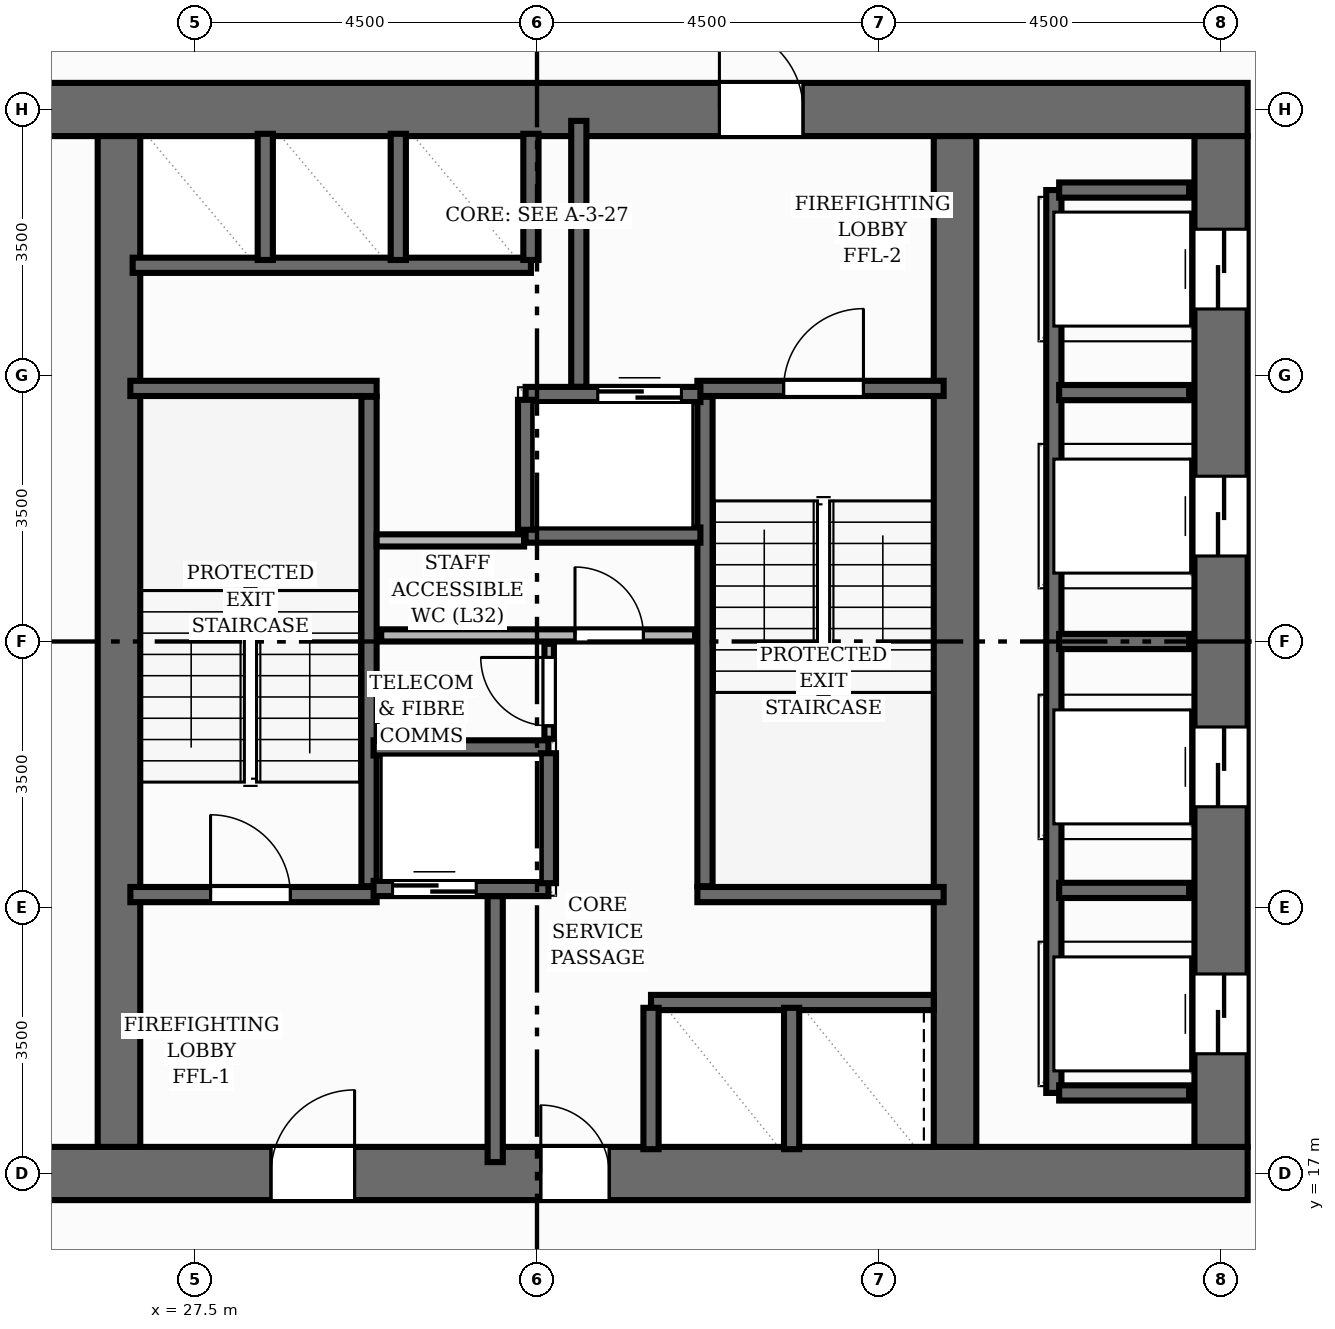
"""IFC4 building model, lengths in metres.
Left out: names, types, materials, properties, quantities, classifications, styles, units other than length and angle.
Written with IfcOpenShell. Run it as: python <this file> out.ifc"""

import sys

from ifc_helpers import new_model, si_unit, direction, frame, frame_2d, origin, place, context, subcontext, project, spatial, rectangle, extrude, element, fill, save


model = new_model("IFC4")
c1 = context("Model", 3, precision=1e-05, world=origin(), true_north=direction((0.0, 1.0)))
c2 = subcontext(c1, "Body", "Model", "MODEL_VIEW")
j1 = project(units=[si_unit("LENGTHUNIT", "METRE"), si_unit("PLANEANGLEUNIT", "RADIAN")], contexts=[c1])
p1 = place(None, origin())
s1 = spatial("IfcSite", under=j1, at=p1, CompositionType="ELEMENT")
p2 = place(p1, origin())
s2 = spatial("IfcBuilding", under=s1, at=p2, CompositionType="ELEMENT")
p3 = place(p2, frame((0.0, 0.0, 109.28)))
s3 = spatial("IfcBuildingStorey", under=s2, at=p3, CompositionType="ELEMENT", Elevation=109.28)
p4 = place(p3, frame((22.65, 17.0, 0.0), z_axis=(0.0, 0.0, 1.0), x_axis=(1.0, 0.0, 0.0)))
e1 = element("IfcWall", 1, at=p4, inside=s3, PredefinedType="SHEAR", context=c2, shape_type="SweptSolid", body=[
    extrude(rectangle(XDim=18.7, YDim=0.7, at=frame_2d((9.35, 0.0))), origin(), (0.0, 0.0, 1.0), 3.2),
])
p5 = place(p4, frame((5.85, 0.0, 0.0)))
e2 = element("IfcOpeningElement", 2, at=p5, cuts=e1, PredefinedType="OPENING", context=c2, shape_type="SweptSolid", body=[
    extrude(rectangle(XDim=1.1, YDim=2.15, at=frame_2d((0.55, 1.075))), frame((0.0, 0.36, 0.0), z_axis=(0.0, -1.0, 0.0), x_axis=(1.0, 0.0, 0.0)), (0.0, 0.0, 1.0), 0.72),
])
p6 = place(p4, frame((9.4, 0.0, 0.0)))
e3 = element("IfcOpeningElement", 3, at=p6, cuts=e1, PredefinedType="OPENING", context=c2, shape_type="SweptSolid", body=[
    extrude(rectangle(XDim=0.9, YDim=2.0, at=frame_2d((0.45, 1.0))), frame((0.0, 0.36, 0.0), z_axis=(0.0, -1.0, 0.0), x_axis=(1.0, 0.0, 0.0)), (0.0, 0.0, 1.0), 0.72),
])
p7 = place(p3, frame((22.65, 31.0, 0.0), z_axis=(0.0, 0.0, 1.0), x_axis=(1.0, 0.0, 0.0)))
e4 = element("IfcWall", 4, at=p7, inside=s3, PredefinedType="SHEAR", context=c2, shape_type="SweptSolid", body=[
    extrude(rectangle(XDim=18.7, YDim=0.7, at=frame_2d((9.35, 0.0))), origin(), (0.0, 0.0, 1.0), 3.2),
])
p8 = place(p7, frame((11.75, 0.0, 0.0)))
e5 = element("IfcOpeningElement", 5, at=p8, cuts=e4, PredefinedType="OPENING", context=c2, shape_type="SweptSolid", body=[
    extrude(rectangle(XDim=1.1, YDim=2.15, at=frame_2d((0.55, 1.075))), frame((0.0, 0.36, 0.0), z_axis=(0.0, -1.0, 0.0), x_axis=(1.0, 0.0, 0.0)), (0.0, 0.0, 1.0), 0.72),
])
p9 = place(p3, frame((41.0, 17.35, 0.0), z_axis=(0.0, 0.0, 1.0), x_axis=(0.0, 1.0, 0.0)))
e6 = element("IfcWall", 6, at=p9, inside=s3, PredefinedType="SHEAR", context=c2, shape_type="SweptSolid", body=[
    extrude(rectangle(XDim=13.3, YDim=0.7, at=frame_2d((6.65, 0.0))), origin(), (0.0, 0.0, 1.0), 3.2),
])
p10 = place(p9, frame((1.225, 0.0, 0.0)))
e7 = element("IfcOpeningElement", 7, at=p10, cuts=e6, PredefinedType="OPENING", context=c2, shape_type="SweptSolid", body=[
    extrude(rectangle(XDim=1.05, YDim=2.0, at=frame_2d((0.525, 1.0))), frame((0.0, 0.36, 0.0), z_axis=(0.0, -1.0, 0.0), x_axis=(1.0, 0.0, 0.0)), (0.0, 0.0, 1.0), 0.72),
])
p11 = place(p9, frame((4.475, 0.0, 0.0)))
e8 = element("IfcOpeningElement", 8, at=p11, cuts=e6, PredefinedType="OPENING", context=c2, shape_type="SweptSolid", body=[
    extrude(rectangle(XDim=1.05, YDim=2.0, at=frame_2d((0.525, 1.0))), frame((0.0, 0.36, 0.0), z_axis=(0.0, -1.0, 0.0), x_axis=(1.0, 0.0, 0.0)), (0.0, 0.0, 1.0), 0.72),
])
p12 = place(p9, frame((7.775, 0.0, 0.0)))
e9 = element("IfcOpeningElement", 9, at=p12, cuts=e6, PredefinedType="OPENING", context=c2, shape_type="SweptSolid", body=[
    extrude(rectangle(XDim=1.05, YDim=2.0, at=frame_2d((0.525, 1.0))), frame((0.0, 0.36, 0.0), z_axis=(0.0, -1.0, 0.0), x_axis=(1.0, 0.0, 0.0)), (0.0, 0.0, 1.0), 0.72),
])
p13 = place(p9, frame((11.025, 0.0, 0.0)))
e10 = element("IfcOpeningElement", 10, at=p13, cuts=e6, PredefinedType="OPENING", context=c2, shape_type="SweptSolid", body=[
    extrude(rectangle(XDim=1.05, YDim=2.0, at=frame_2d((0.525, 1.0))), frame((0.0, 0.36, 0.0), z_axis=(0.0, -1.0, 0.0), x_axis=(1.0, 0.0, 0.0)), (0.0, 0.0, 1.0), 0.72),
])
for number, where, z_axis, x_axis in (
    (11, (26.5, 17.35, 0.0), (0.0, 0.0, 1.0), (0.0, 1.0, 0.0)),
    (12, (37.5, 17.35, 0.0), (0.0, 0.0, 1.0), (0.0, 1.0, 0.0)),
):
    element("IfcWall", number, at=place(p3, frame(where, z_axis=z_axis, x_axis=x_axis)), inside=s3, PredefinedType="SHEAR", context=c2, shape_type="SweptSolid", body=[
        extrude(rectangle(XDim=13.3, YDim=0.56, at=frame_2d((6.65, 0.0))), origin(), (0.0, 0.0, 1.0), 3.2),
    ])
p14 = place(p3, frame((29.79, 20.78, 0.0), z_axis=(0.0, 0.0, 1.0), x_axis=(0.0, 1.0, 0.0)))
e13 = element("IfcWall", 13, at=p14, inside=s3, PredefinedType="SHEAR", context=c2, shape_type="SweptSolid", body=[
    extrude(rectangle(XDim=6.44, YDim=0.2, at=frame_2d((3.22, 0.0))), origin(), (0.0, 0.0, 1.0), 3.2),
])
p15 = place(p3, frame((26.65, 27.33, 0.0), z_axis=(0.0, 0.0, 1.0), x_axis=(1.0, 0.0, 0.0)))
e14 = element("IfcWall", 14, at=p15, inside=s3, PredefinedType="SHEAR", context=c2, shape_type="SweptSolid", body=[
    extrude(rectangle(XDim=3.24, YDim=0.2, at=frame_2d((1.62, 0.0))), origin(), (0.0, 0.0, 1.0), 3.2),
])
p16 = place(p3, frame((26.65, 20.67, 0.0), z_axis=(0.0, 0.0, 1.0), x_axis=(1.0, 0.0, 0.0)))
e15 = element("IfcWall", 15, at=p16, inside=s3, PredefinedType="SHEAR", context=c2, shape_type="SweptSolid", body=[
    extrude(rectangle(XDim=3.24, YDim=0.2, at=frame_2d((1.62, 0.0))), origin(), (0.0, 0.0, 1.0), 3.2),
])
p17 = place(p16, frame((1.055, 0.0, 0.0)))
e16 = element("IfcOpeningElement", 16, at=p17, cuts=e15, PredefinedType="OPENING", context=c2, shape_type="SweptSolid", body=[
    extrude(rectangle(XDim=1.05, YDim=2.15, at=frame_2d((0.525, 1.075))), frame((0.0, 0.11, 0.0), z_axis=(0.0, -1.0, 0.0), x_axis=(1.0, 0.0, 0.0)), (0.0, 0.0, 1.0), 0.22),
])
p18 = place(p3, frame((34.21, 20.78, 0.0), z_axis=(0.0, 0.0, 1.0), x_axis=(0.0, 1.0, 0.0)))
e17 = element("IfcWall", 17, at=p18, inside=s3, PredefinedType="SHEAR", context=c2, shape_type="SweptSolid", body=[
    extrude(rectangle(XDim=6.44, YDim=0.2, at=frame_2d((3.22, 0.0))), origin(), (0.0, 0.0, 1.0), 3.2),
])
p19 = place(p3, frame((34.11, 20.67, 0.0), z_axis=(0.0, 0.0, 1.0), x_axis=(1.0, 0.0, 0.0)))
e18 = element("IfcWall", 18, at=p19, inside=s3, PredefinedType="SHEAR", context=c2, shape_type="SweptSolid", body=[
    extrude(rectangle(XDim=3.24, YDim=0.2, at=frame_2d((1.62, 0.0))), origin(), (0.0, 0.0, 1.0), 3.2),
])
p20 = place(p3, frame((34.11, 27.33, 0.0), z_axis=(0.0, 0.0, 1.0), x_axis=(1.0, 0.0, 0.0)))
e19 = element("IfcWall", 19, at=p20, inside=s3, PredefinedType="SHEAR", context=c2, shape_type="SweptSolid", body=[
    extrude(rectangle(XDim=3.24, YDim=0.2, at=frame_2d((1.62, 0.0))), origin(), (0.0, 0.0, 1.0), 3.2),
])
p21 = place(p20, frame((1.135, 0.0, 0.0)))
e20 = element("IfcOpeningElement", 20, at=p21, cuts=e19, PredefinedType="OPENING", context=c2, shape_type="SweptSolid", body=[
    extrude(rectangle(XDim=1.05, YDim=2.15, at=frame_2d((0.525, 1.075))), frame((0.0, 0.11, 0.0), z_axis=(0.0, -1.0, 0.0), x_axis=(1.0, 0.0, 0.0)), (0.0, 0.0, 1.0), 0.22),
])
for number, where, z_axis, x_axis in (
    (21, (31.45, 17.15, 0.0), (0.0, 0.0, 1.0), (0.0, 1.0, 0.0)),
    (22, (32.55, 27.35, 0.0), (0.0, 0.0, 1.0), (0.0, 1.0, 0.0)),
):
    element("IfcWall", number, at=place(p3, frame(where, z_axis=z_axis, x_axis=x_axis)), inside=s3, PredefinedType="SHEAR", context=c2, shape_type="SweptSolid", body=[
        extrude(rectangle(XDim=3.5, YDim=0.2, at=frame_2d((1.75, 0.0))), origin(), (0.0, 0.0, 1.0), 3.2),
    ])
p22 = place(p3, frame((29.85, 20.75, 0.0), z_axis=(0.0, 0.0, 1.0), x_axis=(1.0, 0.0, 0.0)))
e23 = element("IfcWall", 23, at=p22, inside=s3, PredefinedType="SHEAR", context=c2, shape_type="SweptSolid", body=[
    extrude(rectangle(XDim=2.3, YDim=0.2, at=frame_2d((1.15, 0.0))), origin(), (0.0, 0.0, 1.0), 3.2),
])
p23 = place(p22, frame((0.25, 0.0, 0.0)))
e24 = element("IfcOpeningElement", 24, at=p23, cuts=e23, PredefinedType="OPENING", context=c2, shape_type="SweptSolid", body=[
    extrude(rectangle(XDim=1.1, YDim=2.15, at=frame_2d((0.55, 1.075))), frame((0.0, 0.11, 0.0), z_axis=(0.0, -1.0, 0.0), x_axis=(1.0, 0.0, 0.0)), (0.0, 0.0, 1.0), 0.22),
])
p24 = place(p3, frame((29.85, 22.6, 0.0), z_axis=(0.0, 0.0, 1.0), x_axis=(1.0, 0.0, 0.0)))
e25 = element("IfcWall", 25, at=p24, inside=s3, PredefinedType="SHEAR", context=c2, shape_type="SweptSolid", body=[
    extrude(rectangle(XDim=2.3, YDim=0.2, at=frame_2d((1.15, 0.0))), origin(), (0.0, 0.0, 1.0), 3.2),
])
p25 = place(p3, frame((32.15, 20.82, 0.0), z_axis=(0.0, 0.0, 1.0), x_axis=(0.0, 1.0, 0.0)))
e26 = element("IfcWall", 26, at=p25, inside=s3, PredefinedType="SHEAR", context=c2, shape_type="SweptSolid", body=[
    extrude(rectangle(XDim=1.71, YDim=0.2, at=frame_2d((0.855, 0.0))), origin(), (0.0, 0.0, 1.0), 3.2),
])
p26 = place(p3, frame((31.85, 27.25, 0.0), z_axis=(0.0, 0.0, 1.0), x_axis=(1.0, 0.0, 0.0)))
e27 = element("IfcWall", 27, at=p26, inside=s3, PredefinedType="SHEAR", context=c2, shape_type="SweptSolid", body=[
    extrude(rectangle(XDim=2.3, YDim=0.2, at=frame_2d((1.15, 0.0))), origin(), (0.0, 0.0, 1.0), 3.2),
])
p27 = place(p26, frame((0.95, 0.0, 0.0)))
e28 = element("IfcOpeningElement", 28, at=p27, cuts=e27, PredefinedType="OPENING", context=c2, shape_type="SweptSolid", body=[
    extrude(rectangle(XDim=1.1, YDim=2.15, at=frame_2d((0.55, 1.075))), frame((0.0, 0.11, 0.0), z_axis=(0.0, -1.0, 0.0), x_axis=(1.0, 0.0, 0.0)), (0.0, 0.0, 1.0), 0.22),
])
p28 = place(p3, frame((31.85, 25.4, 0.0), z_axis=(0.0, 0.0, 1.0), x_axis=(1.0, 0.0, 0.0)))
e29 = element("IfcWall", 29, at=p28, inside=s3, PredefinedType="SHEAR", context=c2, shape_type="SweptSolid", body=[
    extrude(rectangle(XDim=2.3, YDim=0.2, at=frame_2d((1.15, 0.0))), origin(), (0.0, 0.0, 1.0), 3.2),
])
p29 = place(p3, frame((31.85, 25.47, 0.0), z_axis=(0.0, 0.0, 1.0), x_axis=(0.0, 1.0, 0.0)))
e30 = element("IfcWall", 30, at=p29, inside=s3, PredefinedType="SHEAR", context=c2, shape_type="SweptSolid", body=[
    extrude(rectangle(XDim=1.71, YDim=0.2, at=frame_2d((0.855, 0.0))), origin(), (0.0, 0.0, 1.0), 3.2),
])
p30 = place(p3, frame((38.8, 18.06, 0.0), z_axis=(0.0, 0.0, 1.0), x_axis=(0.0, 1.0, 0.0)))
e31 = element("IfcWall", 31, at=p30, inside=s3, PredefinedType="SHEAR", context=c2, shape_type="SweptSolid", body=[
    extrude(rectangle(XDim=11.88, YDim=0.2, at=frame_2d((5.94, 0.0))), origin(), (0.0, 0.0, 1.0), 3.2),
])
for number, where, z_axis, x_axis in (
    (32, (38.87, 18.06, 0.0), (0.0, 0.0, 1.0), (1.0, 0.0, 0.0)),
    (33, (38.87, 29.94, 0.0), (0.0, 0.0, 1.0), (1.0, 0.0, 0.0)),
    (34, (38.87, 20.725, 0.0), (0.0, 0.0, 1.0), (1.0, 0.0, 0.0)),
    (35, (38.87, 24.0, 0.0), (0.0, 0.0, 1.0), (1.0, 0.0, 0.0)),
    (36, (38.87, 27.275, 0.0), (0.0, 0.0, 1.0), (1.0, 0.0, 0.0)),
):
    element("IfcWall", number, at=place(p3, frame(where, z_axis=z_axis, x_axis=x_axis)), inside=s3, PredefinedType="SHEAR", context=c2, shape_type="SweptSolid", body=[
        extrude(rectangle(XDim=1.71, YDim=0.2, at=frame_2d((0.855, 0.0))), origin(), (0.0, 0.0, 1.0), 3.2),
    ])
p31 = place(p3, frame((26.68, 28.95, 0.0), z_axis=(0.0, 0.0, 1.0), x_axis=(1.0, 0.0, 0.0)))
e37 = element("IfcWall", 37, at=p31, inside=s3, PredefinedType="SHEAR", context=c2, shape_type="SweptSolid", body=[
    extrude(rectangle(XDim=5.24, YDim=0.2, at=frame_2d((2.62, 0.0))), origin(), (0.0, 0.0, 1.0), 3.2),
])
for number, where, z_axis, x_axis in (
    (38, (31.92, 29.02, 0.0), (0.0, 0.0, 1.0), (0.0, 1.0, 0.0)),
    (39, (28.425, 29.02, 0.0), (0.0, 0.0, 1.0), (0.0, 1.0, 0.0)),
    (40, (30.175, 29.02, 0.0), (0.0, 0.0, 1.0), (0.0, 1.0, 0.0)),
):
    element("IfcWall", number, at=place(p3, frame(where, z_axis=z_axis, x_axis=x_axis)), inside=s3, PredefinedType="SHEAR", context=c2, shape_type="SweptSolid", body=[
        extrude(rectangle(XDim=1.66, YDim=0.2, at=frame_2d((0.83, 0.0))), origin(), (0.0, 0.0, 1.0), 3.2),
    ])
p32 = place(p3, frame((33.5, 19.25, 0.0), z_axis=(0.0, 0.0, 1.0), x_axis=(1.0, 0.0, 0.0)))
e41 = element("IfcWall", 41, at=p32, inside=s3, PredefinedType="SHEAR", context=c2, shape_type="SweptSolid", body=[
    extrude(rectangle(XDim=3.72, YDim=0.2, at=frame_2d((1.86, 0.0))), origin(), (0.0, 0.0, 1.0), 3.2),
])
for number, where, z_axis, x_axis in (
    (42, (33.5, 17.32, 0.0), (0.0, 0.0, 1.0), (0.0, 1.0, 0.0)),
    (43, (35.35, 17.32, 0.0), (0.0, 0.0, 1.0), (0.0, 1.0, 0.0)),
):
    element("IfcWall", number, at=place(p3, frame(where, z_axis=z_axis, x_axis=x_axis)), inside=s3, PredefinedType="SHEAR", context=c2, shape_type="SweptSolid", body=[
        extrude(rectangle(XDim=1.86, YDim=0.2, at=frame_2d((0.93, 0.0))), origin(), (0.0, 0.0, 1.0), 3.2),
    ])
p33 = place(p3, frame((29.95, 24.08, 0.0), z_axis=(0.0, 0.0, 1.0), x_axis=(1.0, 0.0, 0.0)))
e44 = element("IfcWall", 44, at=p33, inside=s3, PredefinedType="PLUMBINGWALL", context=c2, shape_type="SweptSolid", body=[
    extrude(rectangle(XDim=4.13, YDim=0.16, at=frame_2d((2.065, 0.0))), origin(), (0.0, 0.0, 1.0), 2.795),
])
p34 = place(p33, frame((2.55, 0.0, 0.0)))
e45 = element("IfcOpeningElement", 45, at=p34, cuts=e44, PredefinedType="OPENING", context=c2, shape_type="SweptSolid", body=[
    extrude(rectangle(XDim=0.9, YDim=2.1, at=frame_2d((0.45, 1.05))), frame((0.0, 0.09, 0.0), z_axis=(0.0, -1.0, 0.0), x_axis=(1.0, 0.0, 0.0)), (0.0, 0.0, 1.0), 0.18),
])
p35 = place(p3, frame((32.16, 22.72, 0.0), z_axis=(0.0, 0.0, 1.0), x_axis=(0.0, 1.0, 0.0)))
e46 = element("IfcWall", 46, at=p35, inside=s3, PredefinedType="PARTITIONING", context=c2, shape_type="SweptSolid", body=[
    extrude(rectangle(XDim=1.25, YDim=0.125, at=frame_2d((0.625, 0.0))), origin(), (0.0, 0.0, 1.0), 2.795),
])
p36 = place(p35, frame((0.17, 0.0, 0.0)))
e47 = element("IfcOpeningElement", 47, at=p36, cuts=e46, PredefinedType="OPENING", context=c2, shape_type="SweptSolid", body=[
    extrude(rectangle(XDim=0.9, YDim=2.1, at=frame_2d((0.45, 1.05))), frame((0.0, 0.073, 0.0), z_axis=(0.0, -1.0, 0.0), x_axis=(1.0, 0.0, 0.0)), (0.0, 0.0, 1.0), 0.145),
])
p37 = place(p3, frame((29.89, 25.33, 0.0), z_axis=(0.0, 0.0, 1.0), x_axis=(1.0, 0.0, 0.0)))
e48 = element("IfcWall", 48, at=p37, inside=s3, PredefinedType="PLUMBINGWALL", context=c2, shape_type="SweptSolid", body=[
    extrude(rectangle(XDim=1.94, YDim=0.16, at=frame_2d((0.97, 0.0))), origin(), (0.0, 0.0, 1.0), 2.795),
])
p38 = place(p17, origin())
e49 = element("IfcDoor", 49, at=p38, inside=s3, OperationType="SINGLE_SWING_LEFT", PredefinedType="DOOR", context=c2, shape_type="SweptSolid", body=[
    extrude(rectangle(XDim=1.05, YDim=2.15, at=frame_2d((0.525, 1.075))), frame((0.0, 0.025, 0.0), z_axis=(0.0, -1.0, 0.0), x_axis=(1.0, 0.0, 0.0)), (0.0, 0.0, 1.0), 0.05),
])
fill(e16, e49)
p39 = place(p21, origin())
e50 = element("IfcDoor", 50, at=p39, inside=s3, OperationType="SINGLE_SWING_RIGHT", PredefinedType="DOOR", context=c2, shape_type="SweptSolid", body=[
    extrude(rectangle(XDim=1.05, YDim=2.15, at=frame_2d((0.525, 1.075))), frame((0.0, 0.025, 0.0), z_axis=(0.0, -1.0, 0.0), x_axis=(1.0, 0.0, 0.0)), (0.0, 0.0, 1.0), 0.05),
])
fill(e20, e50)
p40 = place(p5, origin())
e51 = element("IfcDoor", 51, at=p40, inside=s3, OperationType="SINGLE_SWING_RIGHT", PredefinedType="DOOR", context=c2, shape_type="SweptSolid", body=[
    extrude(rectangle(XDim=1.1, YDim=2.15, at=frame_2d((0.55, 1.075))), frame((0.0, 0.025, 0.0), z_axis=(0.0, -1.0, 0.0), x_axis=(1.0, 0.0, 0.0)), (0.0, 0.0, 1.0), 0.05),
])
fill(e2, e51)
p41 = place(p8, origin())
e52 = element("IfcDoor", 52, at=p41, inside=s3, OperationType="SINGLE_SWING_LEFT", PredefinedType="DOOR", context=c2, shape_type="SweptSolid", body=[
    extrude(rectangle(XDim=1.1, YDim=2.15, at=frame_2d((0.55, 1.075))), frame((0.0, 0.025, 0.0), z_axis=(0.0, -1.0, 0.0), x_axis=(1.0, 0.0, 0.0)), (0.0, 0.0, 1.0), 0.05),
])
fill(e5, e52)
p42 = place(p23, origin())
e53 = element("IfcDoor", 53, at=p42, inside=s3, OperationType="DOUBLE_DOOR_SLIDING", PredefinedType="DOOR", context=c2, shape_type="SweptSolid", body=[
    extrude(rectangle(XDim=1.1, YDim=2.15, at=frame_2d((0.55, 1.075))), frame((0.0, 0.025, 0.0), z_axis=(0.0, -1.0, 0.0), x_axis=(1.0, 0.0, 0.0)), (0.0, 0.0, 1.0), 0.05),
])
fill(e24, e53)
p43 = place(p27, origin())
e54 = element("IfcDoor", 54, at=p43, inside=s3, OperationType="DOUBLE_DOOR_SLIDING", PredefinedType="DOOR", context=c2, shape_type="SweptSolid", body=[
    extrude(rectangle(XDim=1.1, YDim=2.15, at=frame_2d((0.55, 1.075))), frame((0.0, 0.025, 0.0), z_axis=(0.0, -1.0, 0.0), x_axis=(1.0, 0.0, 0.0)), (0.0, 0.0, 1.0), 0.05),
])
fill(e28, e54)
p44 = place(p10, origin())
e55 = element("IfcDoor", 55, at=p44, inside=s3, OperationType="DOUBLE_DOOR_SLIDING", PredefinedType="DOOR", context=c2, shape_type="SweptSolid", body=[
    extrude(rectangle(XDim=1.05, YDim=2.0, at=frame_2d((0.525, 1.0))), frame((0.0, 0.025, 0.0), z_axis=(0.0, -1.0, 0.0), x_axis=(1.0, 0.0, 0.0)), (0.0, 0.0, 1.0), 0.05),
])
fill(e7, e55)
p45 = place(p11, origin())
e56 = element("IfcDoor", 56, at=p45, inside=s3, OperationType="DOUBLE_DOOR_SLIDING", PredefinedType="DOOR", context=c2, shape_type="SweptSolid", body=[
    extrude(rectangle(XDim=1.05, YDim=2.0, at=frame_2d((0.525, 1.0))), frame((0.0, 0.025, 0.0), z_axis=(0.0, -1.0, 0.0), x_axis=(1.0, 0.0, 0.0)), (0.0, 0.0, 1.0), 0.05),
])
fill(e8, e56)
p46 = place(p12, origin())
e57 = element("IfcDoor", 57, at=p46, inside=s3, OperationType="DOUBLE_DOOR_SLIDING", PredefinedType="DOOR", context=c2, shape_type="SweptSolid", body=[
    extrude(rectangle(XDim=1.05, YDim=2.0, at=frame_2d((0.525, 1.0))), frame((0.0, 0.025, 0.0), z_axis=(0.0, -1.0, 0.0), x_axis=(1.0, 0.0, 0.0)), (0.0, 0.0, 1.0), 0.05),
])
fill(e9, e57)
p47 = place(p13, origin())
e58 = element("IfcDoor", 58, at=p47, inside=s3, OperationType="DOUBLE_DOOR_SLIDING", PredefinedType="DOOR", context=c2, shape_type="SweptSolid", body=[
    extrude(rectangle(XDim=1.05, YDim=2.0, at=frame_2d((0.525, 1.0))), frame((0.0, 0.025, 0.0), z_axis=(0.0, -1.0, 0.0), x_axis=(1.0, 0.0, 0.0)), (0.0, 0.0, 1.0), 0.05),
])
fill(e10, e58)
p48 = place(p6, origin())
e59 = element("IfcDoor", 59, at=p48, inside=s3, OperationType="SINGLE_SWING_LEFT", PredefinedType="DOOR", context=c2, shape_type="SweptSolid", body=[
    extrude(rectangle(XDim=0.9, YDim=2.0, at=frame_2d((0.45, 1.0))), frame((0.0, 0.025, 0.0), z_axis=(0.0, -1.0, 0.0), x_axis=(1.0, 0.0, 0.0)), (0.0, 0.0, 1.0), 0.05),
])
fill(e3, e59)
p49 = place(p34, origin())
e60 = element("IfcDoor", 60, at=p49, inside=s3, OperationType="SINGLE_SWING_LEFT", PredefinedType="DOOR", context=c2, shape_type="SweptSolid", body=[
    extrude(rectangle(XDim=0.9, YDim=2.1, at=frame_2d((0.45, 1.05))), frame((0.0, 0.025, 0.0), z_axis=(0.0, -1.0, 0.0), x_axis=(1.0, 0.0, 0.0)), (0.0, 0.0, 1.0), 0.05),
])
fill(e45, e60)
p50 = place(p36, origin())
e61 = element("IfcDoor", 61, at=p50, inside=s3, OperationType="SINGLE_SWING_RIGHT", PredefinedType="DOOR", context=c2, shape_type="SweptSolid", body=[
    extrude(rectangle(XDim=0.9, YDim=2.1, at=frame_2d((0.45, 1.05))), frame((0.0, 0.025, 0.0), z_axis=(0.0, -1.0, 0.0), x_axis=(1.0, 0.0, 0.0)), (0.0, 0.0, 1.0), 0.05),
])
fill(e47, e61)
save(model, sys.argv[1])
